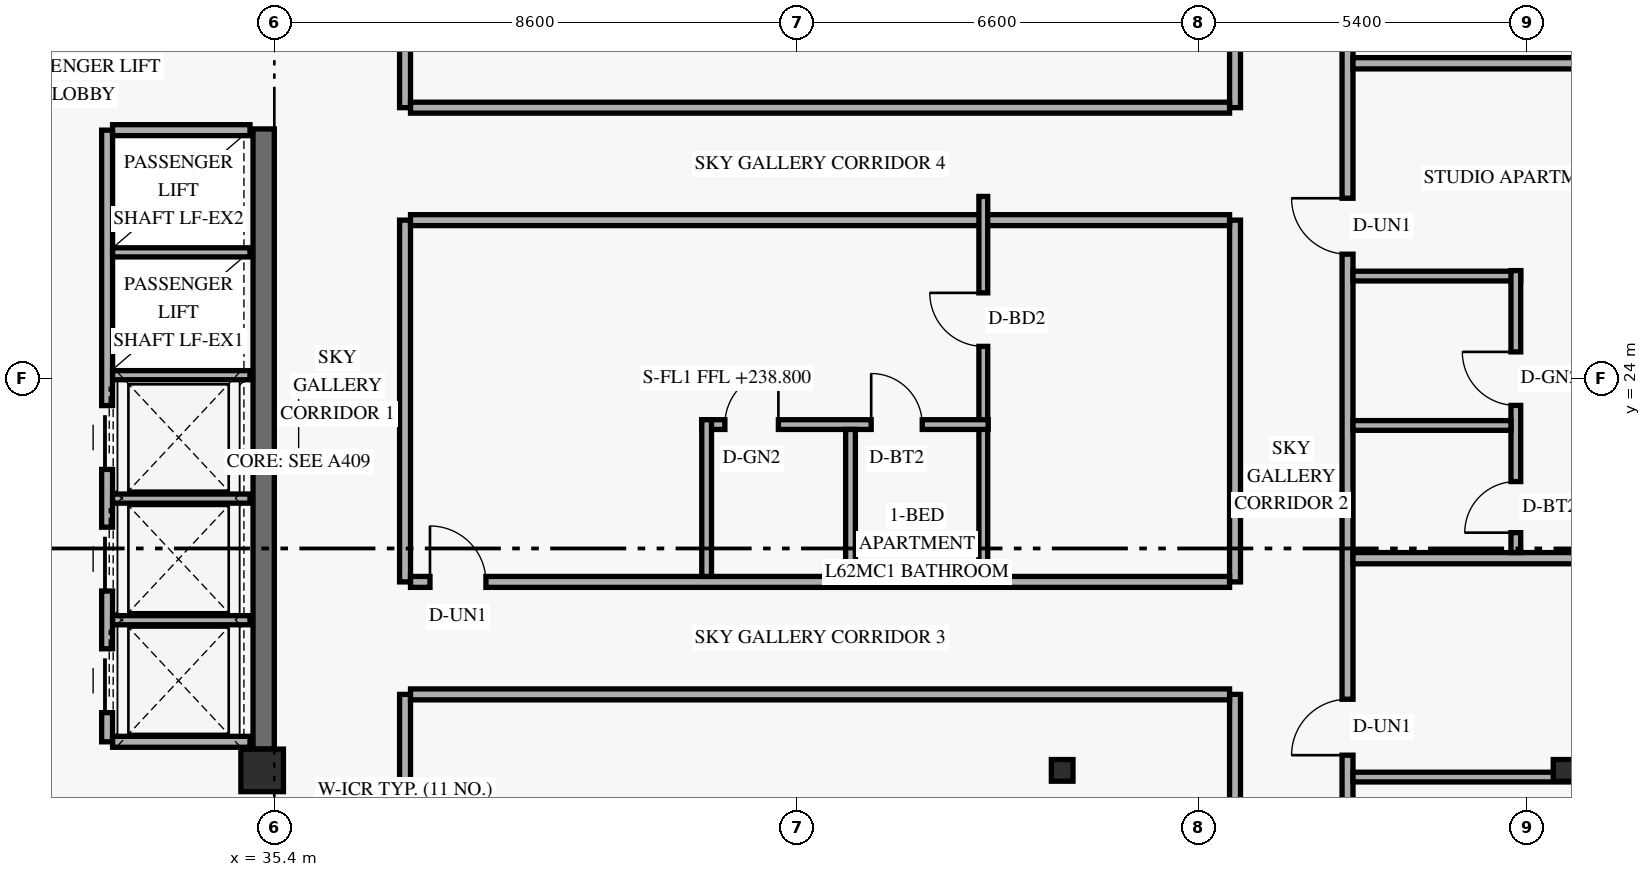
"""IFC4 building model, lengths in metres.
Left out: names, types, materials, properties, quantities, classifications, styles, units other than length and angle.
Written with IfcOpenShell. Run it as: python <this file> out.ifc"""

import sys

from ifc_helpers import new_model, si_unit, direction, frame, frame_2d, origin, origin_2d, place, context, subcontext, project, spatial, rectangle, hollow_rectangle, extrude, element, fill, save


model = new_model("IFC4")
c1 = context("Model", 3, precision=1e-05, world=origin(), true_north=direction((0.0, 1.0)))
c2 = subcontext(c1, "Body", "Model", "MODEL_VIEW")
j1 = project(units=[si_unit("LENGTHUNIT", "METRE"), si_unit("PLANEANGLEUNIT", "RADIAN")], contexts=[c1])
p1 = place(None, origin())
s1 = spatial("IfcSite", under=j1, at=p1, CompositionType="ELEMENT")
p2 = place(p1, origin())
s2 = spatial("IfcBuilding", under=s1, at=p2, CompositionType="ELEMENT")
p3 = place(p2, frame((0.0, 0.0, 238.8)))
s3 = spatial("IfcBuildingStorey", under=s2, at=p3, CompositionType="ELEMENT", Elevation=238.8)
p4 = place(p3, frame((35.225, 17.9, 0.0), z_axis=(0.0, 0.0, 1.0), x_axis=(0.0, 1.0, 0.0)))
e1 = element("IfcWall", 1, at=p4, inside=s3, PredefinedType="SHEAR", context=c2, shape_type="SweptSolid", body=[
    extrude(rectangle(XDim=10.2, YDim=0.35, at=frame_2d((5.1, 0.0))), origin(), (0.0, 0.0, 1.0), 2.821),
])
p5 = place(p3, frame((35.2, 17.55, 0.0), z_axis=(0.0, 0.0, 1.0), x_axis=(1.0, 0.0, 0.0)))
e2 = element("IfcColumn", 2, at=p5, inside=s3, PredefinedType="COLUMN", context=c2, shape_type="SweptSolid", body=[
    extrude(rectangle(XDim=0.7, YDim=0.7, at=origin_2d()), origin(), (0.0, 0.0, 1.0), 3.6),
])
p6 = place(p3, frame((48.294, 17.55, 0.0), z_axis=(0.034973505036, 0.0, 0.999388239847), x_axis=(0.0, 1.0, 0.0)))
e3 = element("IfcColumn", 3, at=p6, inside=s3, PredefinedType="COLUMN", context=c2, shape_type="SweptSolid", body=[
    extrude(hollow_rectangle(XDim=0.356, YDim=0.356, WallThickness=0.016, at=origin_2d()), origin(), (0.0, 0.0, 1.0), 3.602),
])
p7 = place(p3, frame((56.507, 17.55, 0.0), z_axis=(0.057955997462, 0.0, 0.998319138531), x_axis=(0.0, 1.0, 0.0)))
e4 = element("IfcColumn", 4, at=p7, inside=s3, PredefinedType="COLUMN", context=c2, shape_type="SweptSolid", body=[
    extrude(hollow_rectangle(XDim=0.356, YDim=0.356, WallThickness=0.016, at=origin_2d()), origin(), (0.0, 0.0, 1.0), 3.606),
])
p8 = place(p3, frame((32.65, 18.02, 0.0), z_axis=(0.0, 0.0, 1.0), x_axis=(0.0, 1.0, 0.0)))
e5 = element("IfcWall", 5, at=p8, inside=s3, PredefinedType="STANDARD", context=c2, shape_type="SweptSolid", body=[
    extrude(rectangle(XDim=10.06, YDim=0.18, at=frame_2d((5.03, 0.0))), origin(), (0.0, 0.0, 1.0), 3.36),
])
p9 = place(p8, frame((0.48, 0.0, 0.0)))
e6 = element("IfcOpeningElement", 6, at=p9, cuts=e5, PredefinedType="OPENING", context=c2, shape_type="SweptSolid", body=[
    extrude(rectangle(XDim=1.05, YDim=2.2, at=frame_2d((0.525, 1.1))), frame((0.0, 0.1, 0.0), z_axis=(0.0, -1.0, 0.0), x_axis=(1.0, 0.0, 0.0)), (0.0, 0.0, 1.0), 0.2),
])
p10 = place(p8, frame((2.48, 0.0, 0.0)))
e7 = element("IfcOpeningElement", 7, at=p10, cuts=e5, PredefinedType="OPENING", context=c2, shape_type="SweptSolid", body=[
    extrude(rectangle(XDim=1.05, YDim=2.2, at=frame_2d((0.525, 1.1))), frame((0.0, 0.1, 0.0), z_axis=(0.0, -1.0, 0.0), x_axis=(1.0, 0.0, 0.0)), (0.0, 0.0, 1.0), 0.2),
])
p11 = place(p8, frame((4.48, 0.0, 0.0)))
e8 = element("IfcOpeningElement", 8, at=p11, cuts=e5, PredefinedType="OPENING", context=c2, shape_type="SweptSolid", body=[
    extrude(rectangle(XDim=1.05, YDim=2.2, at=frame_2d((0.525, 1.1))), frame((0.0, 0.1, 0.0), z_axis=(0.0, -1.0, 0.0), x_axis=(1.0, 0.0, 0.0)), (0.0, 0.0, 1.0), 0.2),
])
for number, where, z_axis, x_axis in (
    (9, (32.74, 18.02, 0.0), (0.0, 0.0, 1.0), (1.0, 0.0, 0.0)),
    (10, (32.74, 28.08, 0.0), (0.0, 0.0, 1.0), (1.0, 0.0, 0.0)),
):
    element("IfcWall", number, at=place(p3, frame(where, z_axis=z_axis, x_axis=x_axis)), inside=s3, PredefinedType="STANDARD", context=c2, shape_type="SweptSolid", body=[
        extrude(rectangle(XDim=2.26, YDim=0.18, at=frame_2d((1.13, 0.0))), origin(), (0.0, 0.0, 1.0), 3.36),
    ])
for number, where, z_axis, x_axis in (
    (11, (32.74, 20.02, 0.0), (0.0, 0.0, 1.0), (1.0, 0.0, 0.0)),
    (12, (32.74, 22.02, 0.0), (0.0, 0.0, 1.0), (1.0, 0.0, 0.0)),
    (13, (32.74, 24.05, 0.0), (0.0, 0.0, 1.0), (1.0, 0.0, 0.0)),
    (14, (32.74, 26.07, 0.0), (0.0, 0.0, 1.0), (1.0, 0.0, 0.0)),
):
    element("IfcWall", number, at=place(p3, frame(where, z_axis=z_axis, x_axis=x_axis)), inside=s3, PredefinedType="STANDARD", context=c2, shape_type="SweptSolid", body=[
        extrude(rectangle(XDim=2.26, YDim=0.15, at=frame_2d((1.13, 0.0))), origin(), (0.0, 0.0, 1.0), 3.36),
    ])
p12 = place(p3, frame((37.55, 15.653, 0.0), z_axis=(0.0, 0.0, 1.0), x_axis=(0.0, 1.0, 0.0)))
e15 = element("IfcWall", 15, at=p12, inside=s3, PredefinedType="STANDARD", context=c2, shape_type="SweptSolid", body=[
    extrude(rectangle(XDim=3.147, YDim=0.18, at=frame_2d((1.574, 0.0))), origin(), (0.0, 0.0, 1.0), 2.803),
])
p13 = place(p3, frame((37.55, 20.65, 0.0), z_axis=(0.0, 0.0, 1.0), x_axis=(0.0, 1.0, 0.0)))
e16 = element("IfcWall", 16, at=p13, inside=s3, PredefinedType="STANDARD", context=c2, shape_type="SweptSolid", body=[
    extrude(rectangle(XDim=5.95, YDim=0.18, at=frame_2d((2.975, 0.0))), origin(), (0.0, 0.0, 1.0), 3.36),
])
p14 = place(p3, frame((37.55, 28.45, 0.0), z_axis=(0.0, 0.0, 1.0), x_axis=(0.0, 1.0, 0.0)))
e17 = element("IfcWall", 17, at=p14, inside=s3, PredefinedType="STANDARD", context=c2, shape_type="SweptSolid", body=[
    extrude(rectangle(XDim=2.828, YDim=0.18, at=frame_2d((1.414, 0.0))), origin(), (0.0, 0.0, 1.0), 2.803),
])
p15 = place(p3, frame((51.2, 5.77, 0.0), z_axis=(0.0, 0.0, 1.0), x_axis=(0.0, 1.0, 0.0)))
e18 = element("IfcWall", 18, at=p15, inside=s3, PredefinedType="STANDARD", context=c2, shape_type="SweptSolid", body=[
    extrude(rectangle(XDim=13.03, YDim=0.18, at=frame_2d((6.515, 0.0))), origin(), (0.0, 0.0, 1.0), 2.803),
])
p16 = place(p15, frame((3.87, 0.0, 0.0)))
e19 = element("IfcOpeningElement", 19, at=p16, cuts=e18, PredefinedType="OPENING", context=c2, shape_type="SweptSolid", body=[
    extrude(rectangle(XDim=0.92, YDim=2.15, at=frame_2d((0.46, 1.075))), frame((0.0, 0.1, 0.0), z_axis=(0.0, -1.0, 0.0), x_axis=(1.0, 0.0, 0.0)), (0.0, 0.0, 1.0), 0.2),
])
p17 = place(p3, frame((51.2, 20.65, 0.0), z_axis=(0.0, 0.0, 1.0), x_axis=(0.0, 1.0, 0.0)))
e20 = element("IfcWall", 20, at=p17, inside=s3, PredefinedType="STANDARD", context=c2, shape_type="SweptSolid", body=[
    extrude(rectangle(XDim=5.95, YDim=0.18, at=frame_2d((2.975, 0.0))), origin(), (0.0, 0.0, 1.0), 3.36),
])
p18 = place(p3, frame((51.2, 28.45, 0.0), z_axis=(0.0, 0.0, 1.0), x_axis=(0.0, 1.0, 0.0)))
e21 = element("IfcWall", 21, at=p18, inside=s3, PredefinedType="STANDARD", context=c2, shape_type="SweptSolid", body=[
    extrude(rectangle(XDim=13.78, YDim=0.18, at=frame_2d((6.89, 0.0))), origin(), (0.0, 0.0, 1.0), 2.803),
])
p19 = place(p18, frame((7.9, 0.0, 0.0)))
e22 = element("IfcOpeningElement", 22, at=p19, cuts=e21, PredefinedType="OPENING", context=c2, shape_type="SweptSolid", body=[
    extrude(rectangle(XDim=0.92, YDim=2.15, at=frame_2d((0.46, 1.075))), frame((0.0, 0.1, 0.0), z_axis=(0.0, -1.0, 0.0), x_axis=(1.0, 0.0, 0.0)), (0.0, 0.0, 1.0), 0.2),
])
p20 = place(p3, frame((37.64, 18.8, 0.0), z_axis=(0.0, 0.0, 1.0), x_axis=(1.0, 0.0, 0.0)))
e23 = element("IfcWall", 23, at=p20, inside=s3, PredefinedType="STANDARD", context=c2, shape_type="SweptSolid", body=[
    extrude(rectangle(XDim=13.47, YDim=0.18, at=frame_2d((6.735, 0.0))), origin(), (0.0, 0.0, 1.0), 2.803),
])
p21 = place(p3, frame((37.64, 20.65, 0.0), z_axis=(0.0, 0.0, 1.0), x_axis=(1.0, 0.0, 0.0)))
e24 = element("IfcWall", 24, at=p21, inside=s3, PredefinedType="STANDARD", context=c2, shape_type="SweptSolid", body=[
    extrude(rectangle(XDim=13.47, YDim=0.18, at=frame_2d((6.735, 0.0))), origin(), (0.0, 0.0, 1.0), 2.803),
])
p22 = place(p21, frame((0.32, 0.0, 0.0)))
e25 = element("IfcOpeningElement", 25, at=p22, cuts=e24, PredefinedType="OPENING", context=c2, shape_type="SweptSolid", body=[
    extrude(rectangle(XDim=0.92, YDim=2.15, at=frame_2d((0.46, 1.075))), frame((0.0, 0.1, 0.0), z_axis=(0.0, -1.0, 0.0), x_axis=(1.0, 0.0, 0.0)), (0.0, 0.0, 1.0), 0.2),
])
for number, where, z_axis, x_axis in (
    (26, (37.64, 26.6, 0.0), (0.0, 0.0, 1.0), (1.0, 0.0, 0.0)),
    (27, (37.64, 28.45, 0.0), (0.0, 0.0, 1.0), (1.0, 0.0, 0.0)),
):
    element("IfcWall", number, at=place(p3, frame(where, z_axis=z_axis, x_axis=x_axis)), inside=s3, PredefinedType="STANDARD", context=c2, shape_type="SweptSolid", body=[
        extrude(rectangle(XDim=13.47, YDim=0.18, at=frame_2d((6.735, 0.0))), origin(), (0.0, 0.0, 1.0), 2.803),
    ])
p23 = place(p3, frame((53.05, 5.77, 0.0), z_axis=(0.0, 0.0, 1.0), x_axis=(0.0, 1.0, 0.0)))
e28 = element("IfcWall", 28, at=p23, inside=s3, PredefinedType="STANDARD", context=c2, shape_type="SweptSolid", body=[
    extrude(rectangle(XDim=36.46, YDim=0.18, at=frame_2d((18.23, 0.0))), origin(), (0.0, 0.0, 1.0), 2.803),
])
p24 = place(p23, frame((1.357, 0.0, 0.0)))
e29 = element("IfcOpeningElement", 29, at=p24, cuts=e28, PredefinedType="OPENING", context=c2, shape_type="SweptSolid", body=[
    extrude(rectangle(XDim=0.92, YDim=2.15, at=frame_2d((0.46, 1.075))), frame((0.0, 0.1, 0.0), z_axis=(0.0, -1.0, 0.0), x_axis=(1.0, 0.0, 0.0)), (0.0, 0.0, 1.0), 0.2),
])
p25 = place(p23, frame((12.03, 0.0, 0.0)))
e30 = element("IfcOpeningElement", 30, at=p25, cuts=e28, PredefinedType="OPENING", context=c2, shape_type="SweptSolid", body=[
    extrude(rectangle(XDim=0.92, YDim=2.15, at=frame_2d((0.46, 1.075))), frame((0.0, 0.1, 0.0), z_axis=(0.0, -1.0, 0.0), x_axis=(1.0, 0.0, 0.0)), (0.0, 0.0, 1.0), 0.2),
])
p26 = place(p23, frame((20.27, 0.0, 0.0)))
e31 = element("IfcOpeningElement", 31, at=p26, cuts=e28, PredefinedType="OPENING", context=c2, shape_type="SweptSolid", body=[
    extrude(rectangle(XDim=0.92, YDim=2.15, at=frame_2d((0.46, 1.075))), frame((0.0, 0.1, 0.0), z_axis=(0.0, -1.0, 0.0), x_axis=(1.0, 0.0, 0.0)), (0.0, 0.0, 1.0), 0.2),
])
p27 = place(p23, frame((28.21, 0.0, 0.0)))
e32 = element("IfcOpeningElement", 32, at=p27, cuts=e28, PredefinedType="OPENING", context=c2, shape_type="SweptSolid", body=[
    extrude(rectangle(XDim=0.92, YDim=2.15, at=frame_2d((0.46, 1.075))), frame((0.0, 0.1, 0.0), z_axis=(0.0, -1.0, 0.0), x_axis=(1.0, 0.0, 0.0)), (0.0, 0.0, 1.0), 0.2),
])
p28 = place(p23, frame((35.21, 0.0, 0.0)))
e33 = element("IfcOpeningElement", 33, at=p28, cuts=e28, PredefinedType="OPENING", context=c2, shape_type="SweptSolid", body=[
    extrude(rectangle(XDim=0.92, YDim=2.15, at=frame_2d((0.46, 1.075))), frame((0.0, 0.1, 0.0), z_axis=(0.0, -1.0, 0.0), x_axis=(1.0, 0.0, 0.0)), (0.0, 0.0, 1.0), 0.2),
])
p29 = place(p3, frame((53.14, 17.44, 0.0), z_axis=(0.0, 0.0, 1.0), x_axis=(1.0, 0.0, 0.0)))
e34 = element("IfcWall", 34, at=p29, inside=s3, PredefinedType="PLUMBINGWALL", context=c2, shape_type="SweptSolid", body=[
    extrude(rectangle(XDim=5.53, YDim=0.16, at=frame_2d((2.765, 0.0))), origin(), (0.0, 0.0, 1.0), 2.803),
])
p30 = place(p3, frame((53.14, 21.04, 0.0), z_axis=(0.0, 0.0, 1.0), x_axis=(1.0, 0.0, 0.0)))
e35 = element("IfcWall", 35, at=p30, inside=s3, PredefinedType="PARTITIONING", context=c2, shape_type="SweptSolid", body=[
    extrude(rectangle(XDim=8.99, YDim=0.185, at=frame_2d((4.495, 0.0))), origin(), (0.0, 0.0, 1.0), 2.879),
])
p31 = place(p3, frame((53.14, 25.68, 0.0), z_axis=(0.0, 0.0, 1.0), x_axis=(1.0, 0.0, 0.0)))
e36 = element("IfcWall", 36, at=p31, inside=s3, PredefinedType="PLUMBINGWALL", context=c2, shape_type="SweptSolid", body=[
    extrude(rectangle(XDim=2.758, YDim=0.16, at=frame_2d((1.379, 0.0))), origin(), (0.0, 0.0, 1.0), 3.36),
])
p32 = place(p3, frame((55.818, 21.133, 0.0), z_axis=(0.0, 0.0, 1.0), x_axis=(0.0, 1.0, 0.0)))
e37 = element("IfcWall", 37, at=p32, inside=s3, PredefinedType="PLUMBINGWALL", context=c2, shape_type="SweptSolid", body=[
    extrude(rectangle(XDim=4.637, YDim=0.16, at=frame_2d((2.319, 0.0))), origin(), (0.0, 0.0, 1.0), 3.36),
])
p33 = place(p32, frame((0.327, 0.0, 0.0)))
e38 = element("IfcOpeningElement", 38, at=p33, cuts=e37, PredefinedType="OPENING", context=c2, shape_type="SweptSolid", body=[
    extrude(rectangle(XDim=0.84, YDim=2.12, at=frame_2d((0.42, 1.06))), frame((0.0, 0.09, 0.0), z_axis=(0.0, -1.0, 0.0), x_axis=(1.0, 0.0, 0.0)), (0.0, 0.0, 1.0), 0.18),
])
p34 = place(p32, frame((2.42, 0.0, 0.0)))
e39 = element("IfcOpeningElement", 39, at=p34, cuts=e37, PredefinedType="OPENING", context=c2, shape_type="SweptSolid", body=[
    extrude(rectangle(XDim=0.88, YDim=2.12, at=frame_2d((0.44, 1.06))), frame((0.0, 0.09, 0.0), z_axis=(0.0, -1.0, 0.0), x_axis=(1.0, 0.0, 0.0)), (0.0, 0.0, 1.0), 0.18),
])
p35 = place(p3, frame((53.14, 23.223, 0.0), z_axis=(0.0, 0.0, 1.0), x_axis=(1.0, 0.0, 0.0)))
e40 = element("IfcWall", 40, at=p35, inside=s3, PredefinedType="PLUMBINGWALL", context=c2, shape_type="SweptSolid", body=[
    extrude(rectangle(XDim=2.598, YDim=0.16, at=frame_2d((1.299, 0.0))), origin(), (0.0, 0.0, 1.0), 3.36),
])
p36 = place(p3, frame((53.14, 29.18, 0.0), z_axis=(0.0, 0.0, 1.0), x_axis=(1.0, 0.0, 0.0)))
e41 = element("IfcWall", 41, at=p36, inside=s3, PredefinedType="PARTITIONING", context=c2, shape_type="SweptSolid", body=[
    extrude(rectangle(XDim=8.99, YDim=0.185, at=frame_2d((4.495, 0.0))), origin(), (0.0, 0.0, 1.0), 2.879),
])
p37 = place(p3, frame((47.06, 20.74, 0.0), z_axis=(0.0, 0.0, 1.0), x_axis=(0.0, 1.0, 0.0)))
e42 = element("IfcWall", 42, at=p37, inside=s3, PredefinedType="PARTITIONING", context=c2, shape_type="SweptSolid", body=[
    extrude(rectangle(XDim=6.25, YDim=0.145, at=frame_2d((3.125, 0.0))), origin(), (0.0, 0.0, 1.0), 3.36),
])
p38 = place(p37, frame((3.784, 0.0, 0.0)))
e43 = element("IfcOpeningElement", 43, at=p38, cuts=e42, PredefinedType="OPENING", context=c2, shape_type="SweptSolid", body=[
    extrude(rectangle(XDim=0.88, YDim=2.14, at=frame_2d((0.44, 1.07))), frame((0.0, 0.083, 0.0), z_axis=(0.0, -1.0, 0.0), x_axis=(1.0, 0.0, 0.0)), (0.0, 0.0, 1.0), 0.165),
])
p39 = place(p3, frame((42.43, 23.238, 0.0), z_axis=(0.0, 0.0, 1.0), x_axis=(1.0, 0.0, 0.0)))
e44 = element("IfcWall", 44, at=p39, inside=s3, PredefinedType="PLUMBINGWALL", context=c2, shape_type="SweptSolid", body=[
    extrude(rectangle(XDim=4.71, YDim=0.16, at=frame_2d((2.355, 0.0))), origin(), (0.0, 0.0, 1.0), 3.36),
])
p40 = place(p39, frame((0.38, 0.0, 0.0)))
e45 = element("IfcOpeningElement", 45, at=p40, cuts=e44, PredefinedType="OPENING", context=c2, shape_type="SweptSolid", body=[
    extrude(rectangle(XDim=0.88, YDim=2.12, at=frame_2d((0.44, 1.06))), frame((0.0, 0.09, 0.0), z_axis=(0.0, -1.0, 0.0), x_axis=(1.0, 0.0, 0.0)), (0.0, 0.0, 1.0), 0.18),
])
p41 = place(p39, frame((2.786, 0.0, 0.0)))
e46 = element("IfcOpeningElement", 46, at=p41, cuts=e44, PredefinedType="OPENING", context=c2, shape_type="SweptSolid", body=[
    extrude(rectangle(XDim=0.84, YDim=2.12, at=frame_2d((0.42, 1.06))), frame((0.0, 0.09, 0.0), z_axis=(0.0, -1.0, 0.0), x_axis=(1.0, 0.0, 0.0)), (0.0, 0.0, 1.0), 0.18),
])
p42 = place(p3, frame((42.51, 20.74, 0.0), z_axis=(0.0, 0.0, 1.0), x_axis=(0.0, 1.0, 0.0)))
e47 = element("IfcWall", 47, at=p42, inside=s3, PredefinedType="PLUMBINGWALL", context=c2, shape_type="SweptSolid", body=[
    extrude(rectangle(XDim=2.577, YDim=0.16, at=frame_2d((1.289, 0.0))), origin(), (0.0, 0.0, 1.0), 3.36),
])
p43 = place(p3, frame((44.876, 20.74, 0.0), z_axis=(0.0, 0.0, 1.0), x_axis=(0.0, 1.0, 0.0)))
e48 = element("IfcWall", 48, at=p43, inside=s3, PredefinedType="PLUMBINGWALL", context=c2, shape_type="SweptSolid", body=[
    extrude(rectangle(XDim=2.417, YDim=0.16, at=frame_2d((1.209, 0.0))), origin(), (0.0, 0.0, 1.0), 3.36),
])
p44 = place(p9, origin())
e49 = element("IfcDoor", 49, at=p44, inside=s3, OperationType="SLIDING_TO_LEFT", PredefinedType="DOOR", context=c2, shape_type="SweptSolid", body=[
    extrude(rectangle(XDim=1.05, YDim=2.2, at=frame_2d((0.525, 1.1))), frame((0.0, 0.025, 0.0), z_axis=(0.0, -1.0, 0.0), x_axis=(1.0, 0.0, 0.0)), (0.0, 0.0, 1.0), 0.05),
])
fill(e6, e49)
p45 = place(p10, origin())
e50 = element("IfcDoor", 50, at=p45, inside=s3, OperationType="SLIDING_TO_LEFT", PredefinedType="DOOR", context=c2, shape_type="SweptSolid", body=[
    extrude(rectangle(XDim=1.05, YDim=2.2, at=frame_2d((0.525, 1.1))), frame((0.0, 0.025, 0.0), z_axis=(0.0, -1.0, 0.0), x_axis=(1.0, 0.0, 0.0)), (0.0, 0.0, 1.0), 0.05),
])
fill(e7, e50)
p46 = place(p11, origin())
e51 = element("IfcDoor", 51, at=p46, inside=s3, OperationType="SLIDING_TO_LEFT", PredefinedType="DOOR", context=c2, shape_type="SweptSolid", body=[
    extrude(rectangle(XDim=1.05, YDim=2.2, at=frame_2d((0.525, 1.1))), frame((0.0, 0.025, 0.0), z_axis=(0.0, -1.0, 0.0), x_axis=(1.0, 0.0, 0.0)), (0.0, 0.0, 1.0), 0.05),
])
fill(e8, e51)
p47 = place(p25, origin())
e52 = element("IfcDoor", 52, at=p47, inside=s3, OperationType="SINGLE_SWING_LEFT", PredefinedType="DOOR", context=c2, shape_type="SweptSolid", body=[
    extrude(rectangle(XDim=0.92, YDim=2.15, at=frame_2d((0.46, 1.075))), frame((0.0, 0.025, 0.0), z_axis=(0.0, -1.0, 0.0), x_axis=(1.0, 0.0, 0.0)), (0.0, 0.0, 1.0), 0.05),
])
fill(e30, e52)
p48 = place(p26, origin())
e53 = element("IfcDoor", 53, at=p48, inside=s3, OperationType="SINGLE_SWING_RIGHT", PredefinedType="DOOR", context=c2, shape_type="SweptSolid", body=[
    extrude(rectangle(XDim=0.92, YDim=2.15, at=frame_2d((0.46, 1.075))), frame((0.0, 0.025, 0.0), z_axis=(0.0, -1.0, 0.0), x_axis=(1.0, 0.0, 0.0)), (0.0, 0.0, 1.0), 0.05),
])
fill(e31, e53)
p49 = place(p33, origin())
e54 = element("IfcDoor", 54, at=p49, inside=s3, OperationType="SINGLE_SWING_LEFT", PredefinedType="DOOR", context=c2, shape_type="SweptSolid", body=[
    extrude(rectangle(XDim=0.84, YDim=2.12, at=frame_2d((0.42, 1.06))), frame((0.0, 0.025, 0.0), z_axis=(0.0, -1.0, 0.0), x_axis=(1.0, 0.0, 0.0)), (0.0, 0.0, 1.0), 0.05),
])
fill(e38, e54)
p50 = place(p34, origin())
e55 = element("IfcDoor", 55, at=p50, inside=s3, OperationType="SINGLE_SWING_RIGHT", PredefinedType="DOOR", context=c2, shape_type="SweptSolid", body=[
    extrude(rectangle(XDim=0.88, YDim=2.12, at=frame_2d((0.44, 1.06))), frame((0.0, 0.025, 0.0), z_axis=(0.0, -1.0, 0.0), x_axis=(1.0, 0.0, 0.0)), (0.0, 0.0, 1.0), 0.05),
])
fill(e39, e55)
p51 = place(p22, origin())
e56 = element("IfcDoor", 56, at=p51, inside=s3, OperationType="SINGLE_SWING_LEFT", PredefinedType="DOOR", context=c2, shape_type="SweptSolid", body=[
    extrude(rectangle(XDim=0.92, YDim=2.15, at=frame_2d((0.46, 1.075))), frame((0.0, 0.025, 0.0), z_axis=(0.0, -1.0, 0.0), x_axis=(1.0, 0.0, 0.0)), (0.0, 0.0, 1.0), 0.05),
])
fill(e25, e56)
p52 = place(p40, origin())
e57 = element("IfcDoor", 57, at=p52, inside=s3, OperationType="SINGLE_SWING_RIGHT", PredefinedType="DOOR", context=c2, shape_type="SweptSolid", body=[
    extrude(rectangle(XDim=0.88, YDim=2.12, at=frame_2d((0.44, 1.06))), frame((0.0, 0.025, 0.0), z_axis=(0.0, -1.0, 0.0), x_axis=(1.0, 0.0, 0.0)), (0.0, 0.0, 1.0), 0.05),
])
fill(e45, e57)
p53 = place(p41, origin())
e58 = element("IfcDoor", 58, at=p53, inside=s3, OperationType="SINGLE_SWING_LEFT", PredefinedType="DOOR", context=c2, shape_type="SweptSolid", body=[
    extrude(rectangle(XDim=0.84, YDim=2.12, at=frame_2d((0.42, 1.06))), frame((0.0, 0.025, 0.0), z_axis=(0.0, -1.0, 0.0), x_axis=(1.0, 0.0, 0.0)), (0.0, 0.0, 1.0), 0.05),
])
fill(e46, e58)
p54 = place(p38, origin())
e59 = element("IfcDoor", 59, at=p54, inside=s3, OperationType="SINGLE_SWING_RIGHT", PredefinedType="DOOR", context=c2, shape_type="SweptSolid", body=[
    extrude(rectangle(XDim=0.88, YDim=2.14, at=frame_2d((0.44, 1.07))), frame((0.0, 0.025, 0.0), z_axis=(0.0, -1.0, 0.0), x_axis=(1.0, 0.0, 0.0)), (0.0, 0.0, 1.0), 0.05),
])
fill(e43, e59)
save(model, sys.argv[1])
